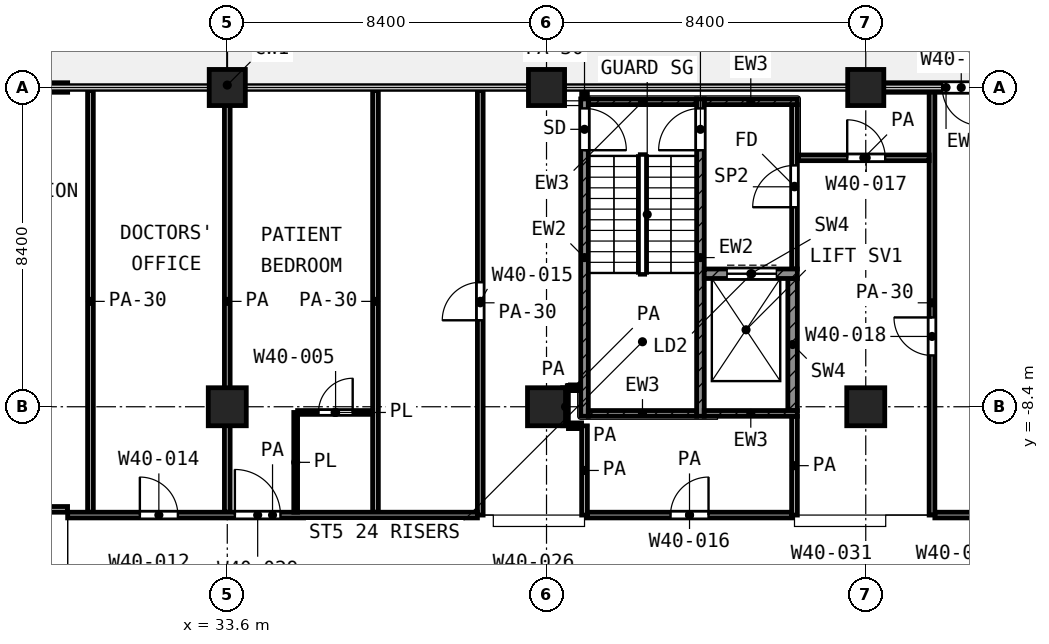
"""IFC4 building model, lengths in metres.
Left out: names, types, materials, properties, quantities, classifications, styles, units other than length and angle.
Written with IfcOpenShell. Run it as: python <this file> out.ifc"""

import sys

from ifc_helpers import new_model, si_unit, direction, frame, frame_2d, origin, origin_2d, place, context, subcontext, project, spatial, rectangle, extrude, element, fill, save


model = new_model("IFC4")
c1 = context("Model", 3, precision=1e-05, world=origin(), true_north=direction((0.0, 1.0)))
c2 = subcontext(c1, "Body", "Model", "MODEL_VIEW")
j1 = project(units=[si_unit("LENGTHUNIT", "METRE"), si_unit("PLANEANGLEUNIT", "RADIAN")], contexts=[c1])
p1 = place(None, origin())
s1 = spatial("IfcSite", under=j1, at=p1, CompositionType="ELEMENT")
p2 = place(p1, origin())
s2 = spatial("IfcBuilding", under=s1, at=p2, CompositionType="ELEMENT")
p3 = place(p2, frame((0.0, 0.0, 175.2)))
s3 = spatial("IfcBuildingStorey", under=s2, at=p3, CompositionType="ELEMENT", Elevation=175.2)
for number, where, z_axis, x_axis in (
    (1, (33.6, 0.0, 0.0), (0.0, 0.0, 1.0), (1.0, 0.0, 0.0)),
    (2, (42.0, 0.0, 0.0), (0.0, 0.0, 1.0), (1.0, 0.0, 0.0)),
    (3, (50.4, 0.0, 0.0), (0.0, 0.0, 1.0), (1.0, 0.0, 0.0)),
):
    element("IfcColumn", number, at=place(p3, frame(where, z_axis=z_axis, x_axis=x_axis)), inside=s3, PredefinedType="COLUMN", context=c2, shape_type="SweptSolid", body=[
        extrude(rectangle(XDim=0.95, YDim=0.95, at=origin_2d()), origin(), (0.0, 0.0, 1.0), 4.2),
    ])
for number, where, z_axis, x_axis in (
    (4, (33.6, -8.4, 0.0), (0.0, 0.0, 1.0), (1.0, 0.0, 0.0)),
    (5, (42.0, -8.4, 0.0), (0.0, 0.0, 1.0), (1.0, 0.0, 0.0)),
    (6, (50.4, -8.4, 0.0), (0.0, 0.0, 1.0), (1.0, 0.0, 0.0)),
):
    element("IfcColumn", number, at=place(p3, frame(where, z_axis=z_axis, x_axis=x_axis)), inside=s3, PredefinedType="COLUMN", context=c2, shape_type="SweptSolid", body=[
        extrude(rectangle(XDim=1.0, YDim=1.0, at=origin_2d()), origin(), (0.0, 0.0, 1.0), 4.2),
    ])
p4 = place(p3, frame((54.15, 0.0, 0.0), z_axis=(0.0, 0.0, 1.0), x_axis=(-1.0, 0.0, 0.0)))
e7 = element("IfcWall", 7, at=p4, inside=s3, PredefinedType="SOLIDWALL", context=c2, shape_type="SweptSolid", body=[
    extrude(rectangle(XDim=3.275, YDim=0.25, at=frame_2d((1.637, 0.0))), origin(), (0.0, 0.0, 1.0), 2.58),
])
p5 = place(p4, frame((0.738, 0.0, 0.0)))
e8 = element("IfcOpeningElement", 8, at=p5, cuts=e7, PredefinedType="OPENING", context=c2, shape_type="SweptSolid", body=[
    extrude(rectangle(XDim=1.0, YDim=2.1, at=frame_2d((0.5, 1.05))), frame((0.0, 0.135, 0.0), z_axis=(0.0, -1.0, 0.0), x_axis=(1.0, 0.0, 0.0)), (0.0, 0.0, 1.0), 0.27),
])
p6 = place(p3, frame((29.4, 0.0, 0.0), z_axis=(0.0, 0.0, 1.0), x_axis=(-1.0, 0.0, 0.0)))
e9 = element("IfcWall", 9, at=p6, inside=s3, PredefinedType="SOLIDWALL", context=c2, shape_type="SweptSolid", body=[
    extrude(rectangle(XDim=3.725, YDim=0.25, at=frame_2d((1.862, 0.0))), origin(), (0.0, 0.0, 1.0), 2.58),
])
p7 = place(p6, frame((0.962, 0.0, 0.0)))
e10 = element("IfcOpeningElement", 10, at=p7, cuts=e9, PredefinedType="OPENING", context=c2, shape_type="SweptSolid", body=[
    extrude(rectangle(XDim=1.8, YDim=2.1, at=frame_2d((0.9, 1.05))), frame((0.0, 0.135, 0.0), z_axis=(0.0, -1.0, 0.0), x_axis=(1.0, 0.0, 0.0)), (0.0, 0.0, 1.0), 0.27),
])
p8 = place(p3, frame((43.0, -8.65, 0.0), z_axis=(0.0, 0.0, 1.0), x_axis=(0.0, 1.0, 0.0)))
e11 = element("IfcWall", 11, at=p8, inside=s3, PredefinedType="SHEAR", context=c2, shape_type="SweptSolid", body=[
    extrude(rectangle(XDim=8.35, YDim=0.2, at=frame_2d((4.175, 0.0))), origin(), (0.0, 0.0, 1.0), 3.6),
])
p9 = place(p8, frame((7.0, 0.0, 0.0)))
e12 = element("IfcOpeningElement", 12, at=p9, cuts=e11, PredefinedType="OPENING", context=c2, shape_type="SweptSolid", body=[
    extrude(rectangle(XDim=1.1, YDim=2.1, at=frame_2d((0.55, 1.05))), frame((0.0, 0.11, 0.0), z_axis=(0.0, -1.0, 0.0), x_axis=(1.0, 0.0, 0.0)), (0.0, 0.0, 1.0), 0.22),
])
p10 = place(p3, frame((46.05, -8.65, 0.0), z_axis=(0.0, 0.0, 1.0), x_axis=(0.0, 1.0, 0.0)))
e13 = element("IfcWall", 13, at=p10, inside=s3, PredefinedType="SHEAR", context=c2, shape_type="SweptSolid", body=[
    extrude(rectangle(XDim=8.35, YDim=0.2, at=frame_2d((4.175, 0.0))), origin(), (0.0, 0.0, 1.0), 3.6),
])
p11 = place(p10, frame((7.0, 0.0, 0.0)))
e14 = element("IfcOpeningElement", 14, at=p11, cuts=e13, PredefinedType="OPENING", context=c2, shape_type="SweptSolid", body=[
    extrude(rectangle(XDim=1.1, YDim=2.1, at=frame_2d((0.55, 1.05))), frame((0.0, 0.11, 0.0), z_axis=(0.0, -1.0, 0.0), x_axis=(1.0, 0.0, 0.0)), (0.0, 0.0, 1.0), 0.22),
])
p12 = place(p3, frame((43.1, -0.375, 0.0), z_axis=(0.0, 0.0, 1.0), x_axis=(1.0, 0.0, 0.0)))
e15 = element("IfcWall", 15, at=p12, inside=s3, PredefinedType="SHEAR", context=c2, shape_type="SweptSolid", body=[
    extrude(rectangle(XDim=2.85, YDim=0.15, at=frame_2d((1.425, 0.0))), origin(), (0.0, 0.0, 1.0), 3.6),
])
p13 = place(p3, frame((46.15, -0.375, 0.0), z_axis=(0.0, 0.0, 1.0), x_axis=(1.0, 0.0, 0.0)))
e16 = element("IfcWall", 16, at=p13, inside=s3, PredefinedType="SHEAR", context=c2, shape_type="SweptSolid", body=[
    extrude(rectangle(XDim=2.45, YDim=0.15, at=frame_2d((1.225, 0.0))), origin(), (0.0, 0.0, 1.0), 3.6),
])
p14 = place(p3, frame((43.1, -8.575, 0.0), z_axis=(0.0, 0.0, 1.0), x_axis=(1.0, 0.0, 0.0)))
e17 = element("IfcWall", 17, at=p14, inside=s3, PredefinedType="SHEAR", context=c2, shape_type="SweptSolid", body=[
    extrude(rectangle(XDim=2.85, YDim=0.15, at=frame_2d((1.425, 0.0))), origin(), (0.0, 0.0, 1.0), 3.6),
])
p15 = place(p3, frame((46.15, -8.575, 0.0), z_axis=(0.0, 0.0, 1.0), x_axis=(1.0, 0.0, 0.0)))
e18 = element("IfcWall", 18, at=p15, inside=s3, PredefinedType="SHEAR", context=c2, shape_type="SweptSolid", body=[
    extrude(rectangle(XDim=2.45, YDim=0.15, at=frame_2d((1.225, 0.0))), origin(), (0.0, 0.0, 1.0), 3.6),
])
p16 = place(p3, frame((46.15, -4.9, 0.0), z_axis=(0.0, 0.0, 1.0), x_axis=(1.0, 0.0, 0.0)))
e19 = element("IfcWall", 19, at=p16, inside=s3, PredefinedType="SHEAR", context=c2, shape_type="SweptSolid", body=[
    extrude(rectangle(XDim=2.45, YDim=0.25, at=frame_2d((1.225, 0.0))), origin(), (0.0, 0.0, 1.0), 3.6),
])
p17 = place(p16, frame((0.6, 0.0, 0.0)))
e20 = element("IfcOpeningElement", 20, at=p17, cuts=e19, PredefinedType="OPENING", context=c2, shape_type="SweptSolid", body=[
    extrude(rectangle(XDim=1.3, YDim=2.1, at=frame_2d((0.65, 1.05))), frame((0.0, 0.135, 0.0), z_axis=(0.0, -1.0, 0.0), x_axis=(1.0, 0.0, 0.0)), (0.0, 0.0, 1.0), 0.27),
])
p18 = place(p3, frame((48.475, -8.5, 0.0), z_axis=(0.0, 0.0, 1.0), x_axis=(0.0, 1.0, 0.0)))
e21 = element("IfcWall", 21, at=p18, inside=s3, PredefinedType="SHEAR", context=c2, shape_type="SweptSolid", body=[
    extrude(rectangle(XDim=3.475, YDim=0.25, at=frame_2d((1.738, 0.0))), origin(), (0.0, 0.0, 1.0), 3.6),
])
p19 = place(p3, frame((48.525, -4.775, 0.0), z_axis=(0.0, 0.0, 1.0), x_axis=(0.0, 1.0, 0.0)))
e22 = element("IfcWall", 22, at=p19, inside=s3, PredefinedType="PARTITIONING", context=c2, shape_type="SweptSolid", body=[
    extrude(rectangle(XDim=4.325, YDim=0.15, at=frame_2d((2.163, 0.0))), origin(), (0.0, 0.0, 1.0), 3.6),
])
p20 = place(p19, frame((1.625, 0.0, 0.0)))
e23 = element("IfcOpeningElement", 23, at=p20, cuts=e22, PredefinedType="OPENING", context=c2, shape_type="SweptSolid", body=[
    extrude(rectangle(XDim=1.1, YDim=2.1, at=frame_2d((0.55, 1.05))), frame((0.0, 0.085, 0.0), z_axis=(0.0, -1.0, 0.0), x_axis=(1.0, 0.0, 0.0)), (0.0, 0.0, 1.0), 0.17),
])
p21 = place(p3, frame((35.45, -8.55, 0.0), z_axis=(0.0, 0.0, 1.0), x_axis=(1.0, 0.0, 0.0)))
e24 = element("IfcWall", 24, at=p21, inside=s3, PredefinedType="PARTITIONING", context=c2, shape_type="SweptSolid", body=[
    extrude(rectangle(XDim=1.975, YDim=0.1, at=frame_2d((0.988, 0.0))), origin(), (0.0, 0.0, 1.0), 3.6),
])
p22 = place(p21, frame((0.55, 0.0, 0.0)))
e25 = element("IfcOpeningElement", 25, at=p22, cuts=e24, PredefinedType="OPENING", context=c2, shape_type="SweptSolid", body=[
    extrude(rectangle(XDim=0.9, YDim=2.1, at=frame_2d((0.45, 1.05))), frame((0.0, 0.06, 0.0), z_axis=(0.0, -1.0, 0.0), x_axis=(1.0, 0.0, 0.0)), (0.0, 0.0, 1.0), 0.12),
])
p23 = place(p3, frame((35.4, -11.175, 0.0), z_axis=(0.0, 0.0, 1.0), x_axis=(0.0, 1.0, 0.0)))
e26 = element("IfcWall", 26, at=p23, inside=s3, PredefinedType="PARTITIONING", context=c2, shape_type="SweptSolid", body=[
    extrude(rectangle(XDim=2.625, YDim=0.1, at=frame_2d((1.312, 0.0))), origin(), (0.0, 0.0, 1.0), 3.6),
])
p24 = place(p3, frame((29.4, -11.25, 0.0), z_axis=(0.0, 0.0, 1.0), x_axis=(1.0, 0.0, 0.0)))
e27 = element("IfcWall", 27, at=p24, inside=s3, PredefinedType="PARTITIONING", context=c2, shape_type="SweptSolid", body=[
    extrude(rectangle(XDim=10.782, YDim=0.15, at=frame_2d((5.391, 0.0))), origin(), (0.0, 0.0, 1.0), 3.6),
])
p25 = place(p24, frame((1.9, 0.0, 0.0)))
e28 = element("IfcOpeningElement", 28, at=p25, cuts=e27, PredefinedType="OPENING", context=c2, shape_type="SweptSolid", body=[
    extrude(rectangle(XDim=1.0, YDim=2.1, at=frame_2d((0.5, 1.05))), frame((0.0, 0.085, 0.0), z_axis=(0.0, -1.0, 0.0), x_axis=(1.0, 0.0, 0.0)), (0.0, 0.0, 1.0), 0.17),
])
p26 = place(p24, frame((4.4, 0.0, 0.0)))
e29 = element("IfcOpeningElement", 29, at=p26, cuts=e27, PredefinedType="OPENING", context=c2, shape_type="SweptSolid", body=[
    extrude(rectangle(XDim=1.2, YDim=2.1, at=frame_2d((0.6, 1.05))), frame((0.0, 0.085, 0.0), z_axis=(0.0, -1.0, 0.0), x_axis=(1.0, 0.0, 0.0)), (0.0, 0.0, 1.0), 0.17),
])
p27 = place(p3, frame((43.075, -11.25, 0.0), z_axis=(0.0, 0.0, 1.0), x_axis=(1.0, 0.0, 0.0)))
e30 = element("IfcWall", 30, at=p27, inside=s3, PredefinedType="PARTITIONING", context=c2, shape_type="SweptSolid", body=[
    extrude(rectangle(XDim=5.375, YDim=0.15, at=frame_2d((2.688, 0.0))), origin(), (0.0, 0.0, 1.0), 3.6),
])
p28 = place(p27, frame((2.188, 0.0, 0.0)))
e31 = element("IfcOpeningElement", 31, at=p28, cuts=e30, PredefinedType="OPENING", context=c2, shape_type="SweptSolid", body=[
    extrude(rectangle(XDim=1.0, YDim=2.1, at=frame_2d((0.5, 1.05))), frame((0.0, 0.085, 0.0), z_axis=(0.0, -1.0, 0.0), x_axis=(1.0, 0.0, 0.0)), (0.0, 0.0, 1.0), 0.17),
])
p29 = place(p3, frame((52.218, -11.25, 0.0), z_axis=(0.0, 0.0, 1.0), x_axis=(1.0, 0.0, 0.0)))
e32 = element("IfcWall", 32, at=p29, inside=s3, PredefinedType="PARTITIONING", context=c2, shape_type="SweptSolid", body=[
    extrude(rectangle(XDim=14.902, YDim=0.15, at=frame_2d((7.451, 0.0))), origin(), (0.0, 0.0, 1.0), 3.6),
])
p30 = place(p29, frame((4.182, 0.0, 0.0)))
e33 = element("IfcOpeningElement", 33, at=p30, cuts=e32, PredefinedType="OPENING", context=c2, shape_type="SweptSolid", body=[
    extrude(rectangle(XDim=1.2, YDim=2.1, at=frame_2d((0.6, 1.05))), frame((0.0, 0.085, 0.0), z_axis=(0.0, -1.0, 0.0), x_axis=(1.0, 0.0, 0.0)), (0.0, 0.0, 1.0), 0.17),
])
p31 = place(p29, frame((10.032, 0.0, 0.0)))
e34 = element("IfcOpeningElement", 34, at=p31, cuts=e32, PredefinedType="OPENING", context=c2, shape_type="SweptSolid", body=[
    extrude(rectangle(XDim=1.5, YDim=2.1, at=frame_2d((0.75, 1.05))), frame((0.0, 0.085, 0.0), z_axis=(0.0, -1.0, 0.0), x_axis=(1.0, 0.0, 0.0)), (0.0, 0.0, 1.0), 0.17),
])
p32 = place(p3, frame((24.9, -11.1, 0.0), z_axis=(0.0, 0.0, 1.0), x_axis=(1.0, 0.0, 0.0)))
e35 = element("IfcWall", 35, at=p32, inside=s3, PredefinedType="PARTITIONING", context=c2, shape_type="SweptSolid", body=[
    extrude(rectangle(XDim=4.498, YDim=0.15, at=frame_2d((2.249, 0.0))), origin(), (0.0, 0.0, 1.0), 3.6),
])
p33 = place(p32, frame((1.799, 0.0, 0.0)))
e36 = element("IfcOpeningElement", 36, at=p33, cuts=e35, PredefinedType="OPENING", context=c2, shape_type="SweptSolid", body=[
    extrude(rectangle(XDim=1.2, YDim=2.1, at=frame_2d((0.6, 1.05))), frame((0.0, 0.085, 0.0), z_axis=(0.0, -1.0, 0.0), x_axis=(1.0, 0.0, 0.0)), (0.0, 0.0, 1.0), 0.17),
])
p34 = place(p3, frame((42.577, -8.9, 0.0), z_axis=(0.0, 0.0, 1.0), x_axis=(1.0, 0.0, 0.0)))
e37 = element("IfcWall", 37, at=p34, inside=s3, PredefinedType="PARTITIONING", context=c2, shape_type="SweptSolid", body=[
    extrude(rectangle(XDim=0.346, YDim=0.15, at=frame_2d((0.173, 0.0))), origin(), (0.0, 0.0, 1.0), 3.6),
])
p35 = place(p3, frame((42.577, -7.9, 0.0), z_axis=(0.0, 0.0, 1.0), x_axis=(1.0, 0.0, 0.0)))
e38 = element("IfcWall", 38, at=p35, inside=s3, PredefinedType="PARTITIONING", context=c2, shape_type="SweptSolid", body=[
    extrude(rectangle(XDim=0.243, YDim=0.15, at=frame_2d((0.122, 0.0))), origin(), (0.0, 0.0, 1.0), 3.6),
])
p36 = place(p3, frame((48.63, -1.85, 0.0), z_axis=(0.0, 0.0, 1.0), x_axis=(1.0, 0.0, 0.0)))
e39 = element("IfcWall", 39, at=p36, inside=s3, PredefinedType="PARTITIONING", context=c2, shape_type="SweptSolid", body=[
    extrude(rectangle(XDim=3.438, YDim=0.15, at=frame_2d((1.719, 0.0))), origin(), (0.0, 0.0, 1.0), 3.6),
])
p37 = place(p36, frame((1.282, 0.0, 0.0)))
e40 = element("IfcOpeningElement", 40, at=p37, cuts=e39, PredefinedType="OPENING", context=c2, shape_type="SweptSolid", body=[
    extrude(rectangle(XDim=1.0, YDim=2.1, at=frame_2d((0.5, 1.05))), frame((0.0, 0.085, 0.0), z_axis=(0.0, -1.0, 0.0), x_axis=(1.0, 0.0, 0.0)), (0.0, 0.0, 1.0), 0.17),
])
p38 = place(p3, frame((30.0, -11.175, 0.0), z_axis=(0.0, 0.0, 1.0), x_axis=(0.0, 1.0, 0.0)))
e41 = element("IfcWall", 41, at=p38, inside=s3, PredefinedType="PARTITIONING", context=c2, shape_type="SweptSolid", body=[
    extrude(rectangle(XDim=11.095, YDim=0.15, at=frame_2d((5.547, 0.0))), origin(), (0.0, 0.0, 1.0), 2.7),
])
p39 = place(p3, frame((33.6, -11.175, 0.0), z_axis=(0.0, 0.0, 1.0), x_axis=(0.0, 1.0, 0.0)))
e42 = element("IfcWall", 42, at=p39, inside=s3, PredefinedType="PARTITIONING", context=c2, shape_type="SweptSolid", body=[
    extrude(rectangle(XDim=11.095, YDim=0.15, at=frame_2d((5.547, 0.0))), origin(), (0.0, 0.0, 1.0), 3.6),
])
p40 = place(p3, frame((37.5, -11.175, 0.0), z_axis=(0.0, 0.0, 1.0), x_axis=(0.0, 1.0, 0.0)))
e43 = element("IfcWall", 43, at=p40, inside=s3, PredefinedType="PARTITIONING", context=c2, shape_type="SweptSolid", body=[
    extrude(rectangle(XDim=11.095, YDim=0.15, at=frame_2d((5.547, 0.0))), origin(), (0.0, 0.0, 1.0), 2.7),
])
p41 = place(p3, frame((40.257, -11.25, 0.0), z_axis=(0.0, 0.0, 1.0), x_axis=(0.0, 1.0, 0.0)))
e44 = element("IfcWall", 44, at=p41, inside=s3, PredefinedType="PARTITIONING", context=c2, shape_type="SweptSolid", body=[
    extrude(rectangle(XDim=11.17, YDim=0.15, at=frame_2d((5.585, 0.0))), origin(), (0.0, 0.0, 1.0), 2.7),
])
p42 = place(p41, frame((5.125, 0.0, 0.0)))
e45 = element("IfcOpeningElement", 45, at=p42, cuts=e44, PredefinedType="OPENING", context=c2, shape_type="SweptSolid", body=[
    extrude(rectangle(XDim=1.0, YDim=2.1, at=frame_2d((0.5, 1.05))), frame((0.0, 0.085, 0.0), z_axis=(0.0, -1.0, 0.0), x_axis=(1.0, 0.0, 0.0)), (0.0, 0.0, 1.0), 0.17),
])
p43 = place(p3, frame((42.5, -8.899, 0.0), z_axis=(0.0, 0.0, 1.0), x_axis=(0.0, 1.0, 0.0)))
e46 = element("IfcWall", 46, at=p43, inside=s3, PredefinedType="PARTITIONING", context=c2, shape_type="SweptSolid", body=[
    extrude(rectangle(XDim=0.997, YDim=0.15, at=frame_2d((0.499, 0.0))), origin(), (0.0, 0.0, 1.0), 3.6),
])
p44 = place(p3, frame((43.0, -11.25, 0.0), z_axis=(0.0, 0.0, 1.0), x_axis=(0.0, 1.0, 0.0)))
e47 = element("IfcWall", 47, at=p44, inside=s3, PredefinedType="PARTITIONING", context=c2, shape_type="SweptSolid", body=[
    extrude(rectangle(XDim=2.348, YDim=0.15, at=frame_2d((1.174, 0.0))), origin(), (0.0, 0.0, 1.0), 3.6),
])
p45 = place(p3, frame((43.0, -0.27, 0.0), z_axis=(0.0, 0.0, 1.0), x_axis=(0.0, 1.0, 0.0)))
e48 = element("IfcWall", 48, at=p45, inside=s3, PredefinedType="PARTITIONING", context=c2, shape_type="SweptSolid", body=[
    extrude(rectangle(XDim=0.19, YDim=0.15, at=frame_2d((0.095, 0.0))), origin(), (0.0, 0.0, 1.0), 2.7),
])
p46 = place(p3, frame((48.525, -11.25, 0.0), z_axis=(0.0, 0.0, 1.0), x_axis=(0.0, 1.0, 0.0)))
e49 = element("IfcWall", 49, at=p46, inside=s3, PredefinedType="PARTITIONING", context=c2, shape_type="SweptSolid", body=[
    extrude(rectangle(XDim=2.6, YDim=0.15, at=frame_2d((1.3, 0.0))), origin(), (0.0, 0.0, 1.0), 3.6),
])
p47 = place(p3, frame((52.143, -11.25, 0.0), z_axis=(0.0, 0.0, 1.0), x_axis=(0.0, 1.0, 0.0)))
e50 = element("IfcWall", 50, at=p47, inside=s3, PredefinedType="PARTITIONING", context=c2, shape_type="SweptSolid", body=[
    extrude(rectangle(XDim=11.17, YDim=0.15, at=frame_2d((5.585, 0.0))), origin(), (0.0, 0.0, 1.0), 2.7),
])
p48 = place(p47, frame((4.2, 0.0, 0.0)))
e51 = element("IfcOpeningElement", 51, at=p48, cuts=e50, PredefinedType="OPENING", context=c2, shape_type="SweptSolid", body=[
    extrude(rectangle(XDim=1.0, YDim=2.1, at=frame_2d((0.5, 1.05))), frame((0.0, 0.085, 0.0), z_axis=(0.0, -1.0, 0.0), x_axis=(1.0, 0.0, 0.0)), (0.0, 0.0, 1.0), 0.17),
])
p49 = place(p5, origin())
e52 = element("IfcDoor", 52, at=p49, inside=s3, OperationType="SINGLE_SWING_LEFT", PredefinedType="DOOR", context=c2, shape_type="SweptSolid", body=[
    extrude(rectangle(XDim=1.0, YDim=2.1, at=frame_2d((0.5, 1.05))), frame((0.0, 0.025, 0.0), z_axis=(0.0, -1.0, 0.0), x_axis=(1.0, 0.0, 0.0)), (0.0, 0.0, 1.0), 0.05),
])
fill(e8, e52)
p50 = place(p9, frame((1.1, 0.0, 0.0), z_axis=(0.0, 0.0, 1.0), x_axis=(-1.0, 0.0, 0.0)))
e53 = element("IfcDoor", 53, at=p50, inside=s3, OperationType="SINGLE_SWING_LEFT", PredefinedType="DOOR", context=c2, shape_type="SweptSolid", body=[
    extrude(rectangle(XDim=1.1, YDim=2.1, at=frame_2d((0.55, 1.05))), frame((0.0, 0.025, 0.0), z_axis=(0.0, -1.0, 0.0), x_axis=(1.0, 0.0, 0.0)), (0.0, 0.0, 1.0), 0.05),
])
fill(e12, e53)
p51 = place(p11, origin())
e54 = element("IfcDoor", 54, at=p51, inside=s3, OperationType="SINGLE_SWING_LEFT", PredefinedType="DOOR", context=c2, shape_type="SweptSolid", body=[
    extrude(rectangle(XDim=1.1, YDim=2.1, at=frame_2d((0.55, 1.05))), frame((0.0, 0.025, 0.0), z_axis=(0.0, -1.0, 0.0), x_axis=(1.0, 0.0, 0.0)), (0.0, 0.0, 1.0), 0.05),
])
fill(e14, e54)
p52 = place(p17, origin())
e55 = element("IfcDoor", 55, at=p52, inside=s3, OperationType="DOUBLE_DOOR_SLIDING", PredefinedType="DOOR", context=c2, shape_type="SweptSolid", body=[
    extrude(rectangle(XDim=1.3, YDim=2.1, at=frame_2d((0.65, 1.05))), frame((0.0, 0.025, 0.0), z_axis=(0.0, -1.0, 0.0), x_axis=(1.0, 0.0, 0.0)), (0.0, 0.0, 1.0), 0.05),
])
fill(e20, e55)
p53 = place(p20, origin())
e56 = element("IfcDoor", 56, at=p53, inside=s3, OperationType="SINGLE_SWING_LEFT", PredefinedType="DOOR", context=c2, shape_type="SweptSolid", body=[
    extrude(rectangle(XDim=1.1, YDim=2.1, at=frame_2d((0.55, 1.05))), frame((0.0, 0.025, 0.0), z_axis=(0.0, -1.0, 0.0), x_axis=(1.0, 0.0, 0.0)), (0.0, 0.0, 1.0), 0.05),
])
fill(e23, e56)
p54 = place(p25, origin())
e57 = element("IfcDoor", 57, at=p54, inside=s3, OperationType="SINGLE_SWING_LEFT", PredefinedType="DOOR", context=c2, shape_type="SweptSolid", body=[
    extrude(rectangle(XDim=1.0, YDim=2.1, at=frame_2d((0.5, 1.05))), frame((0.0, 0.025, 0.0), z_axis=(0.0, -1.0, 0.0), x_axis=(1.0, 0.0, 0.0)), (0.0, 0.0, 1.0), 0.05),
])
fill(e28, e57)
p55 = place(p26, origin())
e58 = element("IfcDoor", 58, at=p55, inside=s3, OperationType="SINGLE_SWING_LEFT", PredefinedType="DOOR", context=c2, shape_type="SweptSolid", body=[
    extrude(rectangle(XDim=1.2, YDim=2.1, at=frame_2d((0.6, 1.05))), frame((0.0, 0.025, 0.0), z_axis=(0.0, -1.0, 0.0), x_axis=(1.0, 0.0, 0.0)), (0.0, 0.0, 1.0), 0.05),
])
fill(e29, e58)
p56 = place(p22, origin())
e59 = element("IfcDoor", 59, at=p56, inside=s3, OperationType="SINGLE_SWING_RIGHT", PredefinedType="DOOR", context=c2, shape_type="SweptSolid", body=[
    extrude(rectangle(XDim=0.9, YDim=2.1, at=frame_2d((0.45, 1.05))), frame((0.0, 0.025, 0.0), z_axis=(0.0, -1.0, 0.0), x_axis=(1.0, 0.0, 0.0)), (0.0, 0.0, 1.0), 0.05),
])
fill(e25, e59)
p57 = place(p42, origin())
e60 = element("IfcDoor", 60, at=p57, inside=s3, OperationType="SINGLE_SWING_LEFT", PredefinedType="DOOR", context=c2, shape_type="SweptSolid", body=[
    extrude(rectangle(XDim=1.0, YDim=2.1, at=frame_2d((0.5, 1.05))), frame((0.0, 0.025, 0.0), z_axis=(0.0, -1.0, 0.0), x_axis=(1.0, 0.0, 0.0)), (0.0, 0.0, 1.0), 0.05),
])
fill(e45, e60)
p58 = place(p28, origin())
e61 = element("IfcDoor", 61, at=p58, inside=s3, OperationType="SINGLE_SWING_RIGHT", PredefinedType="DOOR", context=c2, shape_type="SweptSolid", body=[
    extrude(rectangle(XDim=1.0, YDim=2.1, at=frame_2d((0.5, 1.05))), frame((0.0, 0.025, 0.0), z_axis=(0.0, -1.0, 0.0), x_axis=(1.0, 0.0, 0.0)), (0.0, 0.0, 1.0), 0.05),
])
fill(e31, e61)
p59 = place(p37, origin())
e62 = element("IfcDoor", 62, at=p59, inside=s3, OperationType="SINGLE_SWING_LEFT", PredefinedType="DOOR", context=c2, shape_type="SweptSolid", body=[
    extrude(rectangle(XDim=1.0, YDim=2.1, at=frame_2d((0.5, 1.05))), frame((0.0, 0.025, 0.0), z_axis=(0.0, -1.0, 0.0), x_axis=(1.0, 0.0, 0.0)), (0.0, 0.0, 1.0), 0.05),
])
fill(e40, e62)
p60 = place(p48, origin())
e63 = element("IfcDoor", 63, at=p60, inside=s3, OperationType="SINGLE_SWING_RIGHT", PredefinedType="DOOR", context=c2, shape_type="SweptSolid", body=[
    extrude(rectangle(XDim=1.0, YDim=2.1, at=frame_2d((0.5, 1.05))), frame((0.0, 0.025, 0.0), z_axis=(0.0, -1.0, 0.0), x_axis=(1.0, 0.0, 0.0)), (0.0, 0.0, 1.0), 0.05),
])
fill(e51, e63)
save(model, sys.argv[1])
